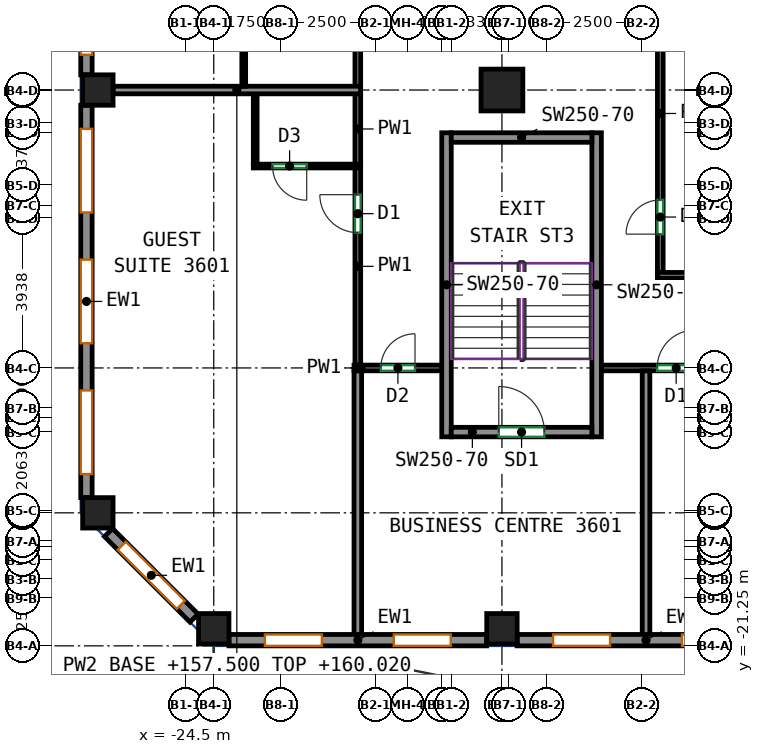
"""IFC4 building model, lengths in metres.
Left out: names, types, materials, properties, quantities, classifications, styles, units other than length and angle.
Written with IfcOpenShell. Run it as: python <this file> out.ifc"""

import sys

from ifc_helpers import new_model, si_unit, direction, frame, frame_2d, origin, origin_2d, place, context, subcontext, project, spatial, rectangle, extrude, source, transform, mapped, element, fill, save


model = new_model("IFC4")
c1 = context("Model", 3, precision=1e-05, world=origin(), true_north=direction((0.0, 1.0)))
c2 = subcontext(c1, "Body", "Model", "MODEL_VIEW")
j1 = project(units=[si_unit("LENGTHUNIT", "METRE"), si_unit("PLANEANGLEUNIT", "RADIAN")], contexts=[c1])
p1 = place(None, origin())
s1 = spatial("IfcSite", under=j1, at=p1, CompositionType="ELEMENT")
p2 = place(p1, origin())
s2 = spatial("IfcBuilding", under=s1, at=p2, CompositionType="ELEMENT")
p3 = place(p2, frame((0.0, 0.0, 157.5)))
s3 = spatial("IfcBuildingStorey", under=s2, at=p3, CompositionType="ELEMENT", Elevation=157.5)
m1 = source(origin(), c2, "Body", "SweptSolid", [
    extrude(rectangle(XDim=0.8, YDim=0.8, at=origin_2d()), origin(), (0.0, 0.0, 1.0), 3.12),
])
for number, where, z_axis, x_axis in (
    (1, (-26.8, -17.75, 0.0), (0.0, 0.0, 1.0), (1.0, 0.0, 0.0)),
    (2, (-26.8, -6.625, 0.0), (0.0, 0.0, 1.0), (1.0, 0.0, 0.0)),
    (3, (-23.75, -20.8, 0.0), (0.0, 0.0, 1.0), (1.0, 0.0, 0.0)),
    (4, (-16.167, -20.8, 0.0), (0.0, 0.0, 1.0), (1.0, 0.0, 0.0)),
):
    element("IfcColumn", number, at=place(p3, frame(where, z_axis=z_axis, x_axis=x_axis)), inside=s3, PredefinedType="COLUMN", context=c2, shape_type="MappedRepresentation", body=[
        mapped(m1, transform((0.0, 0.0, 0.0))),
    ])
m2 = source(origin(), c2, "Body", "SweptSolid", [
    extrude(rectangle(XDim=1.1, YDim=1.1, at=origin_2d()), origin(), (0.0, 0.0, 1.0), 3.12),
])
p4 = place(p3, frame((-16.167, -6.625, 0.0), z_axis=(0.0, 0.0, 1.0), x_axis=(1.0, 0.0, 0.0)))
e5 = element("IfcColumn", 5, at=p4, inside=s3, PredefinedType="COLUMN", context=c2, shape_type="MappedRepresentation", body=[
    mapped(m2, transform((0.0, 0.0, 0.0))),
])
m3 = source(origin(), c2, "Body", "SweptSolid", [
    extrude(rectangle(XDim=8.0, YDim=0.25, at=frame_2d((4.0, 0.0))), origin(), (0.0, 0.0, 1.0), 3.12),
])
for number, where, z_axis, x_axis in (
    (6, (-17.625, -15.75, 0.0), (0.0, 0.0, 1.0), (0.0, 1.0, 0.0)),
    (7, (-13.675, -15.75, 0.0), (0.0, 0.0, 1.0), (0.0, 1.0, 0.0)),
):
    element("IfcWall", number, at=place(p3, frame(where, z_axis=z_axis, x_axis=x_axis)), inside=s3, PredefinedType="SHEAR", context=c2, shape_type="MappedRepresentation", body=[
        mapped(m3, transform((0.0, 0.0, 0.0))),
    ])
m4 = source(origin(), c2, "Body", "SweptSolid", [
    extrude(rectangle(XDim=3.7, YDim=0.25, at=frame_2d((1.85, 0.0))), origin(), (0.0, 0.0, 1.0), 3.12),
])
p5 = place(p3, frame((-17.5, -15.625, 0.0), z_axis=(0.0, 0.0, 1.0), x_axis=(1.0, 0.0, 0.0)))
e8 = element("IfcWall", 8, at=p5, inside=s3, PredefinedType="SHEAR", context=c2, shape_type="MappedRepresentation", body=[
    mapped(m4, transform((0.0, 0.0, 0.0))),
])
p6 = place(p5, frame((1.25, 0.0, 0.0)))
e9 = element("IfcOpeningElement", 9, at=p6, cuts=e8, PredefinedType="OPENING", context=c2, shape_type="SweptSolid", body=[
    extrude(rectangle(XDim=1.2, YDim=2.1, at=frame_2d((0.6, 1.05))), frame((0.0, 0.135, 0.0), z_axis=(0.0, -1.0, 0.0), x_axis=(1.0, 0.0, 0.0)), (0.0, 0.0, 1.0), 0.27),
])
p7 = place(p3, frame((-17.5, -7.875, 0.0), z_axis=(0.0, 0.0, 1.0), x_axis=(1.0, 0.0, 0.0)))
e10 = element("IfcWall", 10, at=p7, inside=s3, PredefinedType="SHEAR", context=c2, shape_type="MappedRepresentation", body=[
    mapped(m4, transform((0.0, 0.0, 0.0))),
])
m5 = source(origin(), c2, "Body", "SweptSolid", [
    extrude(rectangle(XDim=6.783, YDim=0.3, at=frame_2d((3.392, 0.0))), origin(), (0.0, 0.0, 1.0), 3.12),
])
p8 = place(p3, frame((-23.35, -21.1, 0.0), z_axis=(0.0, 0.0, 1.0), x_axis=(1.0, 0.0, 0.0)))
e11 = element("IfcWall", 11, at=p8, inside=s3, PredefinedType="SOLIDWALL", context=c2, shape_type="MappedRepresentation", body=[
    mapped(m5, transform((0.0, 0.0, 0.0))),
])
p9 = place(p8, frame((0.946, 0.0, 0.85)))
e12 = element("IfcOpeningElement", 12, at=p9, cuts=e11, PredefinedType="OPENING", context=c2, shape_type="SweptSolid", body=[
    extrude(rectangle(XDim=1.5, YDim=1.95, at=frame_2d((0.75, 0.975))), frame((0.0, 0.16, 0.0), z_axis=(0.0, -1.0, 0.0), x_axis=(1.0, 0.0, 0.0)), (0.0, 0.0, 1.0), 0.32),
])
p10 = place(p8, frame((4.337, 0.0, 0.85)))
e13 = element("IfcOpeningElement", 13, at=p10, cuts=e11, PredefinedType="OPENING", context=c2, shape_type="SweptSolid", body=[
    extrude(rectangle(XDim=1.5, YDim=1.95, at=frame_2d((0.75, 0.975))), frame((0.0, 0.16, 0.0), z_axis=(0.0, -1.0, 0.0), x_axis=(1.0, 0.0, 0.0)), (0.0, 0.0, 1.0), 0.32),
])
m6 = source(origin(), c2, "Body", "SweptSolid", [
    extrude(rectangle(XDim=6.783, YDim=0.3, at=frame_2d((3.392, 0.0))), origin(), (0.0, 0.0, 1.0), 3.12),
])
p11 = place(p3, frame((-15.767, -21.1, 0.0), z_axis=(0.0, 0.0, 1.0), x_axis=(1.0, 0.0, 0.0)))
e14 = element("IfcWall", 14, at=p11, inside=s3, PredefinedType="SOLIDWALL", context=c2, shape_type="MappedRepresentation", body=[
    mapped(m6, transform((0.0, 0.0, 0.0))),
])
p12 = place(p11, frame((0.946, 0.0, 0.85)))
e15 = element("IfcOpeningElement", 15, at=p12, cuts=e14, PredefinedType="OPENING", context=c2, shape_type="SweptSolid", body=[
    extrude(rectangle(XDim=1.5, YDim=1.95, at=frame_2d((0.75, 0.975))), frame((0.0, 0.16, 0.0), z_axis=(0.0, -1.0, 0.0), x_axis=(1.0, 0.0, 0.0)), (0.0, 0.0, 1.0), 0.32),
])
p13 = place(p11, frame((4.338, 0.0, 0.85)))
e16 = element("IfcOpeningElement", 16, at=p13, cuts=e14, PredefinedType="OPENING", context=c2, shape_type="SweptSolid", body=[
    extrude(rectangle(XDim=1.5, YDim=1.95, at=frame_2d((0.75, 0.975))), frame((0.0, 0.16, 0.0), z_axis=(0.0, -1.0, 0.0), x_axis=(1.0, 0.0, 0.0)), (0.0, 0.0, 1.0), 0.32),
])
m7 = source(origin(), c2, "Body", "SweptSolid", [
    extrude(rectangle(XDim=6.513, YDim=0.3, at=frame_2d((3.256, 0.0))), origin(), (0.0, 0.0, 1.0), 3.12),
])
p14 = place(p3, frame((-27.1, 0.288, 0.0), z_axis=(0.0, 0.0, 1.0), x_axis=(0.0, -1.0, 0.0)))
e17 = element("IfcWall", 17, at=p14, inside=s3, PredefinedType="SOLIDWALL", context=c2, shape_type="MappedRepresentation", body=[
    mapped(m7, transform((0.0, 0.0, 0.0))),
])
p15 = place(p14, frame((0.528, 0.0, 0.85)))
e18 = element("IfcOpeningElement", 18, at=p15, cuts=e17, PredefinedType="OPENING", context=c2, shape_type="SweptSolid", body=[
    extrude(rectangle(XDim=2.2, YDim=1.95, at=frame_2d((1.1, 0.975))), frame((0.0, 0.16, 0.0), z_axis=(0.0, -1.0, 0.0), x_axis=(1.0, 0.0, 0.0)), (0.0, 0.0, 1.0), 0.32),
])
p16 = place(p14, frame((3.784, 0.0, 0.85)))
e19 = element("IfcOpeningElement", 19, at=p16, cuts=e17, PredefinedType="OPENING", context=c2, shape_type="SweptSolid", body=[
    extrude(rectangle(XDim=2.2, YDim=1.95, at=frame_2d((1.1, 0.975))), frame((0.0, 0.16, 0.0), z_axis=(0.0, -1.0, 0.0), x_axis=(1.0, 0.0, 0.0)), (0.0, 0.0, 1.0), 0.32),
])
m8 = source(origin(), c2, "Body", "SweptSolid", [
    extrude(rectangle(XDim=10.325, YDim=0.3, at=frame_2d((5.163, 0.0))), origin(), (0.0, 0.0, 1.0), 3.12),
])
p17 = place(p3, frame((-27.1, -7.025, 0.0), z_axis=(0.0, 0.0, 1.0), x_axis=(0.0, -1.0, 0.0)))
e20 = element("IfcWall", 20, at=p17, inside=s3, PredefinedType="SOLIDWALL", context=c2, shape_type="MappedRepresentation", body=[
    mapped(m8, transform((0.0, 0.0, 0.0))),
])
p18 = place(p17, frame((0.621, 0.0, 0.85)))
e21 = element("IfcOpeningElement", 21, at=p18, cuts=e20, PredefinedType="OPENING", context=c2, shape_type="SweptSolid", body=[
    extrude(rectangle(XDim=2.2, YDim=1.95, at=frame_2d((1.1, 0.975))), frame((0.0, 0.16, 0.0), z_axis=(0.0, -1.0, 0.0), x_axis=(1.0, 0.0, 0.0)), (0.0, 0.0, 1.0), 0.32),
])
p19 = place(p17, frame((4.062, 0.0, 0.85)))
e22 = element("IfcOpeningElement", 22, at=p19, cuts=e20, PredefinedType="OPENING", context=c2, shape_type="SweptSolid", body=[
    extrude(rectangle(XDim=2.2, YDim=1.95, at=frame_2d((1.1, 0.975))), frame((0.0, 0.16, 0.0), z_axis=(0.0, -1.0, 0.0), x_axis=(1.0, 0.0, 0.0)), (0.0, 0.0, 1.0), 0.32),
])
p20 = place(p17, frame((7.504, 0.0, 0.85)))
e23 = element("IfcOpeningElement", 23, at=p20, cuts=e20, PredefinedType="OPENING", context=c2, shape_type="SweptSolid", body=[
    extrude(rectangle(XDim=2.2, YDim=1.95, at=frame_2d((1.1, 0.975))), frame((0.0, 0.16, 0.0), z_axis=(0.0, -1.0, 0.0), x_axis=(1.0, 0.0, 0.0)), (0.0, 0.0, 1.0), 0.32),
])
m9 = source(origin(), c2, "Body", "SweptSolid", [
    extrude(rectangle(XDim=3.182, YDim=0.3, at=frame_2d((1.591, 0.0))), origin(), (0.0, 0.0, 1.0), 3.12),
])
p21 = place(p3, frame((-26.519, -18.269, 0.0), z_axis=(0.0, 0.0, 1.0), x_axis=(0.707068419229, -0.707145141063, 0.0)))
e24 = element("IfcWall", 24, at=p21, inside=s3, PredefinedType="SOLIDWALL", context=c2, shape_type="MappedRepresentation", body=[
    mapped(m9, transform((0.0, 0.0, 0.0))),
])
p22 = place(p21, frame((0.491, 0.0, 0.85)))
e25 = element("IfcOpeningElement", 25, at=p22, cuts=e24, PredefinedType="OPENING", context=c2, shape_type="SweptSolid", body=[
    extrude(rectangle(XDim=2.2, YDim=1.95, at=frame_2d((1.1, 0.975))), frame((0.0, 0.16, 0.0), z_axis=(0.0, -1.0, 0.0), x_axis=(1.0, 0.0, 0.0)), (0.0, 0.0, 1.0), 0.32),
])
p23 = place(p3, frame((-13.55, -13.938, 0.0), z_axis=(0.0, 0.0, 1.0), x_axis=(1.0, 0.0, 0.0)))
e26 = element("IfcWall", 26, at=p23, inside=s3, PredefinedType="PARTITIONING", context=c2, shape_type="SweptSolid", body=[
    extrude(rectangle(XDim=4.417, YDim=0.15, at=frame_2d((2.208, 0.0))), origin(), (0.0, 0.0, 1.0), 3.12),
])
p24 = place(p23, frame((1.468, 0.0, 0.0)))
e27 = element("IfcOpeningElement", 27, at=p24, cuts=e26, PredefinedType="OPENING", context=c2, shape_type="SweptSolid", body=[
    extrude(rectangle(XDim=1.0, YDim=2.1, at=frame_2d((0.5, 1.05))), frame((0.0, 0.085, 0.0), z_axis=(0.0, -1.0, 0.0), x_axis=(1.0, 0.0, 0.0)), (0.0, 0.0, 1.0), 0.17),
])
p25 = place(p3, frame((-20.059, -13.938, 0.0), z_axis=(0.0, 0.0, 1.0), x_axis=(1.0, 0.0, 0.0)))
e28 = element("IfcWall", 28, at=p25, inside=s3, PredefinedType="PARTITIONING", context=c2, shape_type="SweptSolid", body=[
    extrude(rectangle(XDim=2.309, YDim=0.15, at=frame_2d((1.155, 0.0))), origin(), (0.0, 0.0, 1.0), 3.12),
])
p26 = place(p25, frame((0.705, 0.0, 0.0)))
e29 = element("IfcOpeningElement", 29, at=p26, cuts=e28, PredefinedType="OPENING", context=c2, shape_type="SweptSolid", body=[
    extrude(rectangle(XDim=0.9, YDim=2.1, at=frame_2d((0.45, 1.05))), frame((0.0, 0.085, 0.0), z_axis=(0.0, -1.0, 0.0), x_axis=(1.0, 0.0, 0.0)), (0.0, 0.0, 1.0), 0.17),
])
p27 = place(p3, frame((-19.959, -13.863, 0.0), z_axis=(0.0, 0.0, 1.0), x_axis=(0.0, 1.0, 0.0)))
e30 = element("IfcWall", 30, at=p27, inside=s3, PredefinedType="PARTITIONING", context=c2, shape_type="SweptSolid", body=[
    extrude(rectangle(XDim=5.198, YDim=0.15, at=frame_2d((2.599, 0.0))), origin(), (0.0, 0.0, 1.0), 3.12),
])
p28 = place(p27, frame((3.485, 0.0, 0.0)))
e31 = element("IfcOpeningElement", 31, at=p28, cuts=e30, PredefinedType="OPENING", context=c2, shape_type="SweptSolid", body=[
    extrude(rectangle(XDim=1.0, YDim=2.1, at=frame_2d((0.5, 1.05))), frame((0.0, 0.085, 0.0), z_axis=(0.0, -1.0, 0.0), x_axis=(1.0, 0.0, 0.0)), (0.0, 0.0, 1.0), 0.17),
])
p29 = place(p3, frame((-19.959, -8.585, 0.0), z_axis=(0.0, 0.0, 1.0), x_axis=(0.0, 1.0, 0.0)))
e32 = element("IfcWall", 32, at=p29, inside=s3, PredefinedType="PARTITIONING", context=c2, shape_type="SweptSolid", body=[
    extrude(rectangle(XDim=1.87, YDim=0.15, at=frame_2d((0.935, 0.0))), origin(), (0.0, 0.0, 1.0), 3.12),
])
p30 = place(p3, frame((-19.959, -6.535, 0.0), z_axis=(0.0, 0.0, 1.0), x_axis=(0.0, 1.0, 0.0)))
e33 = element("IfcWall", 33, at=p30, inside=s3, PredefinedType="PARTITIONING", context=c2, shape_type="SweptSolid", body=[
    extrude(rectangle(XDim=2.07, YDim=0.15, at=frame_2d((1.035, 0.0))), origin(), (0.0, 0.0, 1.0), 3.12),
])
p31 = place(p3, frame((-12.0, -11.425, 0.0), z_axis=(0.0, 0.0, 1.0), x_axis=(0.0, 1.0, 0.0)))
e34 = element("IfcWall", 34, at=p31, inside=s3, PredefinedType="PARTITIONING", context=c2, shape_type="SweptSolid", body=[
    extrude(rectangle(XDim=8.366, YDim=0.15, at=frame_2d((4.183, 0.0))), origin(), (0.0, 0.0, 1.0), 3.12),
])
p32 = place(p31, frame((1.008, 0.0, 0.0)))
e35 = element("IfcOpeningElement", 35, at=p32, cuts=e34, PredefinedType="OPENING", context=c2, shape_type="SweptSolid", body=[
    extrude(rectangle(XDim=0.9, YDim=2.1, at=frame_2d((0.45, 1.05))), frame((0.0, 0.085, 0.0), z_axis=(0.0, -1.0, 0.0), x_axis=(1.0, 0.0, 0.0)), (0.0, 0.0, 1.0), 0.17),
])
p33 = place(p3, frame((-12.075, -11.5, 0.0), z_axis=(0.0, 0.0, 1.0), x_axis=(1.0, 0.0, 0.0)))
e36 = element("IfcWall", 36, at=p33, inside=s3, PredefinedType="PARTITIONING", context=c2, shape_type="SweptSolid", body=[
    extrude(rectangle(XDim=28.35, YDim=0.15, at=frame_2d((14.175, 0.0))), origin(), (0.0, 0.0, 1.0), 3.12),
])
p34 = place(p33, frame((18.584, 0.0, 0.0)))
e37 = element("IfcOpeningElement", 37, at=p34, cuts=e36, PredefinedType="OPENING", context=c2, shape_type="SweptSolid", body=[
    extrude(rectangle(XDim=0.9, YDim=2.1, at=frame_2d((0.45, 1.05))), frame((0.0, 0.085, 0.0), z_axis=(0.0, -1.0, 0.0), x_axis=(1.0, 0.0, 0.0)), (0.0, 0.0, 1.0), 0.17),
])
for number, where, z_axis, x_axis in (
    (38, (-12.375, -21.0, 0.0), (0.0, 0.0, 1.0), (0.0, 1.0, 0.0)),
    (39, (-19.959, -21.0, 0.0), (0.0, 0.0, 1.0), (0.0, 1.0, 0.0)),
):
    element("IfcWall", number, at=place(p3, frame(where, z_axis=z_axis, x_axis=x_axis)), inside=s3, PredefinedType="PARTITIONING", context=c2, shape_type="SweptSolid", body=[
        extrude(rectangle(XDim=6.985, YDim=0.2, at=frame_2d((3.493, 0.0))), origin(), (0.0, 0.0, 1.0), 3.12),
    ])
p35 = place(p3, frame((-22.659, -8.575, 0.0), z_axis=(0.0, 0.0, 1.0), x_axis=(0.0, 1.0, 0.0)))
e40 = element("IfcWall", 40, at=p35, inside=s3, PredefinedType="PARTITIONING", context=c2, shape_type="SweptSolid", body=[
    extrude(rectangle(XDim=1.85, YDim=0.1, at=frame_2d((0.925, 0.0))), origin(), (0.0, 0.0, 1.0), 3.12),
])
p36 = place(p3, frame((-19.886, -8.625, 0.0), z_axis=(0.0, 0.0, 1.0), x_axis=(-1.0, 0.0, 0.0)))
e41 = element("IfcWall", 41, at=p36, inside=s3, PredefinedType="PARTITIONING", context=c2, shape_type="SweptSolid", body=[
    extrude(rectangle(XDim=2.823, YDim=0.1, at=frame_2d((1.412, 0.0))), origin(), (0.0, 0.0, 1.0), 3.12),
])
p37 = place(p36, frame((1.418, 0.0, 0.0)))
e42 = element("IfcOpeningElement", 42, at=p37, cuts=e41, PredefinedType="OPENING", context=c2, shape_type="SweptSolid", body=[
    extrude(rectangle(XDim=0.9, YDim=2.1, at=frame_2d((0.45, 1.05))), frame((0.0, 0.06, 0.0), z_axis=(0.0, -1.0, 0.0), x_axis=(1.0, 0.0, 0.0)), (0.0, 0.0, 1.0), 0.12),
])
p38 = place(p3, frame((-26.4, -6.625, 0.0), z_axis=(0.0, 0.0, 1.0), x_axis=(1.0, 0.0, 0.0)))
e43 = element("IfcWall", 43, at=p38, inside=s3, PredefinedType="PARTITIONING", context=c2, shape_type="SweptSolid", body=[
    extrude(rectangle(XDim=6.514, YDim=0.2, at=frame_2d((3.257, 0.0))), origin(), (0.0, 0.0, 1.0), 2.52),
])
p39 = place(p3, frame((-22.961, -6.525, 0.0), z_axis=(0.0, 0.0, 1.0), x_axis=(0.0, 1.0, 0.0)))
e44 = element("IfcWall", 44, at=p39, inside=s3, PredefinedType="PARTITIONING", context=c2, shape_type="SweptSolid", body=[
    extrude(rectangle(XDim=2.05, YDim=0.1, at=frame_2d((1.025, 0.0))), origin(), (0.0, 0.0, 1.0), 3.12),
])
p40 = place(p9, origin())
e45 = element("IfcWindow", 45, at=p40, inside=s3, PartitioningType="SINGLE_PANEL", PredefinedType="WINDOW", context=c2, shape_type="SweptSolid", body=[
    extrude(rectangle(XDim=1.5, YDim=1.95, at=frame_2d((0.75, 0.975))), frame((0.0, 0.03, 0.0), z_axis=(0.0, -1.0, 0.0), x_axis=(1.0, 0.0, 0.0)), (0.0, 0.0, 1.0), 0.06),
])
fill(e12, e45)
p41 = place(p10, origin())
e46 = element("IfcWindow", 46, at=p41, inside=s3, PartitioningType="SINGLE_PANEL", PredefinedType="WINDOW", context=c2, shape_type="SweptSolid", body=[
    extrude(rectangle(XDim=1.5, YDim=1.95, at=frame_2d((0.75, 0.975))), frame((0.0, 0.03, 0.0), z_axis=(0.0, -1.0, 0.0), x_axis=(1.0, 0.0, 0.0)), (0.0, 0.0, 1.0), 0.06),
])
fill(e13, e46)
p42 = place(p12, origin())
e47 = element("IfcWindow", 47, at=p42, inside=s3, PartitioningType="SINGLE_PANEL", PredefinedType="WINDOW", context=c2, shape_type="SweptSolid", body=[
    extrude(rectangle(XDim=1.5, YDim=1.95, at=frame_2d((0.75, 0.975))), frame((0.0, 0.03, 0.0), z_axis=(0.0, -1.0, 0.0), x_axis=(1.0, 0.0, 0.0)), (0.0, 0.0, 1.0), 0.06),
])
fill(e15, e47)
p43 = place(p13, origin())
e48 = element("IfcWindow", 48, at=p43, inside=s3, PartitioningType="SINGLE_PANEL", PredefinedType="WINDOW", context=c2, shape_type="SweptSolid", body=[
    extrude(rectangle(XDim=1.5, YDim=1.95, at=frame_2d((0.75, 0.975))), frame((0.0, 0.03, 0.0), z_axis=(0.0, -1.0, 0.0), x_axis=(1.0, 0.0, 0.0)), (0.0, 0.0, 1.0), 0.06),
])
fill(e16, e48)
p44 = place(p16, origin())
e49 = element("IfcWindow", 49, at=p44, inside=s3, PartitioningType="SINGLE_PANEL", PredefinedType="WINDOW", context=c2, shape_type="SweptSolid", body=[
    extrude(rectangle(XDim=2.2, YDim=1.95, at=frame_2d((1.1, 0.975))), frame((0.0, 0.03, 0.0), z_axis=(0.0, -1.0, 0.0), x_axis=(1.0, 0.0, 0.0)), (0.0, 0.0, 1.0), 0.06),
])
fill(e19, e49)
p45 = place(p18, origin())
e50 = element("IfcWindow", 50, at=p45, inside=s3, PartitioningType="SINGLE_PANEL", PredefinedType="WINDOW", context=c2, shape_type="SweptSolid", body=[
    extrude(rectangle(XDim=2.2, YDim=1.95, at=frame_2d((1.1, 0.975))), frame((0.0, 0.03, 0.0), z_axis=(0.0, -1.0, 0.0), x_axis=(1.0, 0.0, 0.0)), (0.0, 0.0, 1.0), 0.06),
])
fill(e21, e50)
p46 = place(p19, origin())
e51 = element("IfcWindow", 51, at=p46, inside=s3, PartitioningType="SINGLE_PANEL", PredefinedType="WINDOW", context=c2, shape_type="SweptSolid", body=[
    extrude(rectangle(XDim=2.2, YDim=1.95, at=frame_2d((1.1, 0.975))), frame((0.0, 0.03, 0.0), z_axis=(0.0, -1.0, 0.0), x_axis=(1.0, 0.0, 0.0)), (0.0, 0.0, 1.0), 0.06),
])
fill(e22, e51)
p47 = place(p20, origin())
e52 = element("IfcWindow", 52, at=p47, inside=s3, PartitioningType="SINGLE_PANEL", PredefinedType="WINDOW", context=c2, shape_type="SweptSolid", body=[
    extrude(rectangle(XDim=2.2, YDim=1.95, at=frame_2d((1.1, 0.975))), frame((0.0, 0.03, 0.0), z_axis=(0.0, -1.0, 0.0), x_axis=(1.0, 0.0, 0.0)), (0.0, 0.0, 1.0), 0.06),
])
fill(e23, e52)
p48 = place(p22, origin())
e53 = element("IfcWindow", 53, at=p48, inside=s3, PartitioningType="SINGLE_PANEL", PredefinedType="WINDOW", context=c2, shape_type="SweptSolid", body=[
    extrude(rectangle(XDim=2.2, YDim=1.95, at=frame_2d((1.1, 0.975))), frame((0.0, 0.03, 0.0), z_axis=(0.0, -1.0, 0.0), x_axis=(1.0, 0.0, 0.0)), (0.0, 0.0, 1.0), 0.06),
])
fill(e25, e53)
p49 = place(p6, origin())
e54 = element("IfcDoor", 54, at=p49, inside=s3, OperationType="DOUBLE_DOOR_SINGLE_SWING", PredefinedType="DOOR", context=c2, shape_type="SweptSolid", body=[
    extrude(rectangle(XDim=1.2, YDim=2.1, at=frame_2d((0.6, 1.05))), frame((0.0, 0.025, 0.0), z_axis=(0.0, -1.0, 0.0), x_axis=(1.0, 0.0, 0.0)), (0.0, 0.0, 1.0), 0.05),
])
fill(e9, e54)
p50 = place(p26, origin())
e55 = element("IfcDoor", 55, at=p50, inside=s3, OperationType="SINGLE_SWING_RIGHT", PredefinedType="DOOR", context=c2, shape_type="SweptSolid", body=[
    extrude(rectangle(XDim=0.9, YDim=2.1, at=frame_2d((0.45, 1.05))), frame((0.0, 0.025, 0.0), z_axis=(0.0, -1.0, 0.0), x_axis=(1.0, 0.0, 0.0)), (0.0, 0.0, 1.0), 0.05),
])
fill(e29, e55)
p51 = place(p24, origin())
e56 = element("IfcDoor", 56, at=p51, inside=s3, OperationType="SINGLE_SWING_RIGHT", PredefinedType="DOOR", context=c2, shape_type="SweptSolid", body=[
    extrude(rectangle(XDim=1.0, YDim=2.1, at=frame_2d((0.5, 1.05))), frame((0.0, 0.025, 0.0), z_axis=(0.0, -1.0, 0.0), x_axis=(1.0, 0.0, 0.0)), (0.0, 0.0, 1.0), 0.05),
])
fill(e27, e56)
p52 = place(p32, origin())
e57 = element("IfcDoor", 57, at=p52, inside=s3, OperationType="SINGLE_SWING_LEFT", PredefinedType="DOOR", context=c2, shape_type="SweptSolid", body=[
    extrude(rectangle(XDim=0.9, YDim=2.1, at=frame_2d((0.45, 1.05))), frame((0.0, 0.025, 0.0), z_axis=(0.0, -1.0, 0.0), x_axis=(1.0, 0.0, 0.0)), (0.0, 0.0, 1.0), 0.05),
])
fill(e35, e57)
p53 = place(p28, origin())
e58 = element("IfcDoor", 58, at=p53, inside=s3, OperationType="SINGLE_SWING_RIGHT", PredefinedType="DOOR", context=c2, shape_type="SweptSolid", body=[
    extrude(rectangle(XDim=1.0, YDim=2.1, at=frame_2d((0.5, 1.05))), frame((0.0, 0.025, 0.0), z_axis=(0.0, -1.0, 0.0), x_axis=(1.0, 0.0, 0.0)), (0.0, 0.0, 1.0), 0.05),
])
fill(e31, e58)
p54 = place(p37, origin())
e59 = element("IfcDoor", 59, at=p54, inside=s3, OperationType="SINGLE_SWING_LEFT", PredefinedType="DOOR", context=c2, shape_type="SweptSolid", body=[
    extrude(rectangle(XDim=0.9, YDim=2.1, at=frame_2d((0.45, 1.05))), frame((0.0, 0.025, 0.0), z_axis=(0.0, -1.0, 0.0), x_axis=(1.0, 0.0, 0.0)), (0.0, 0.0, 1.0), 0.05),
])
fill(e42, e59)
save(model, sys.argv[1])
